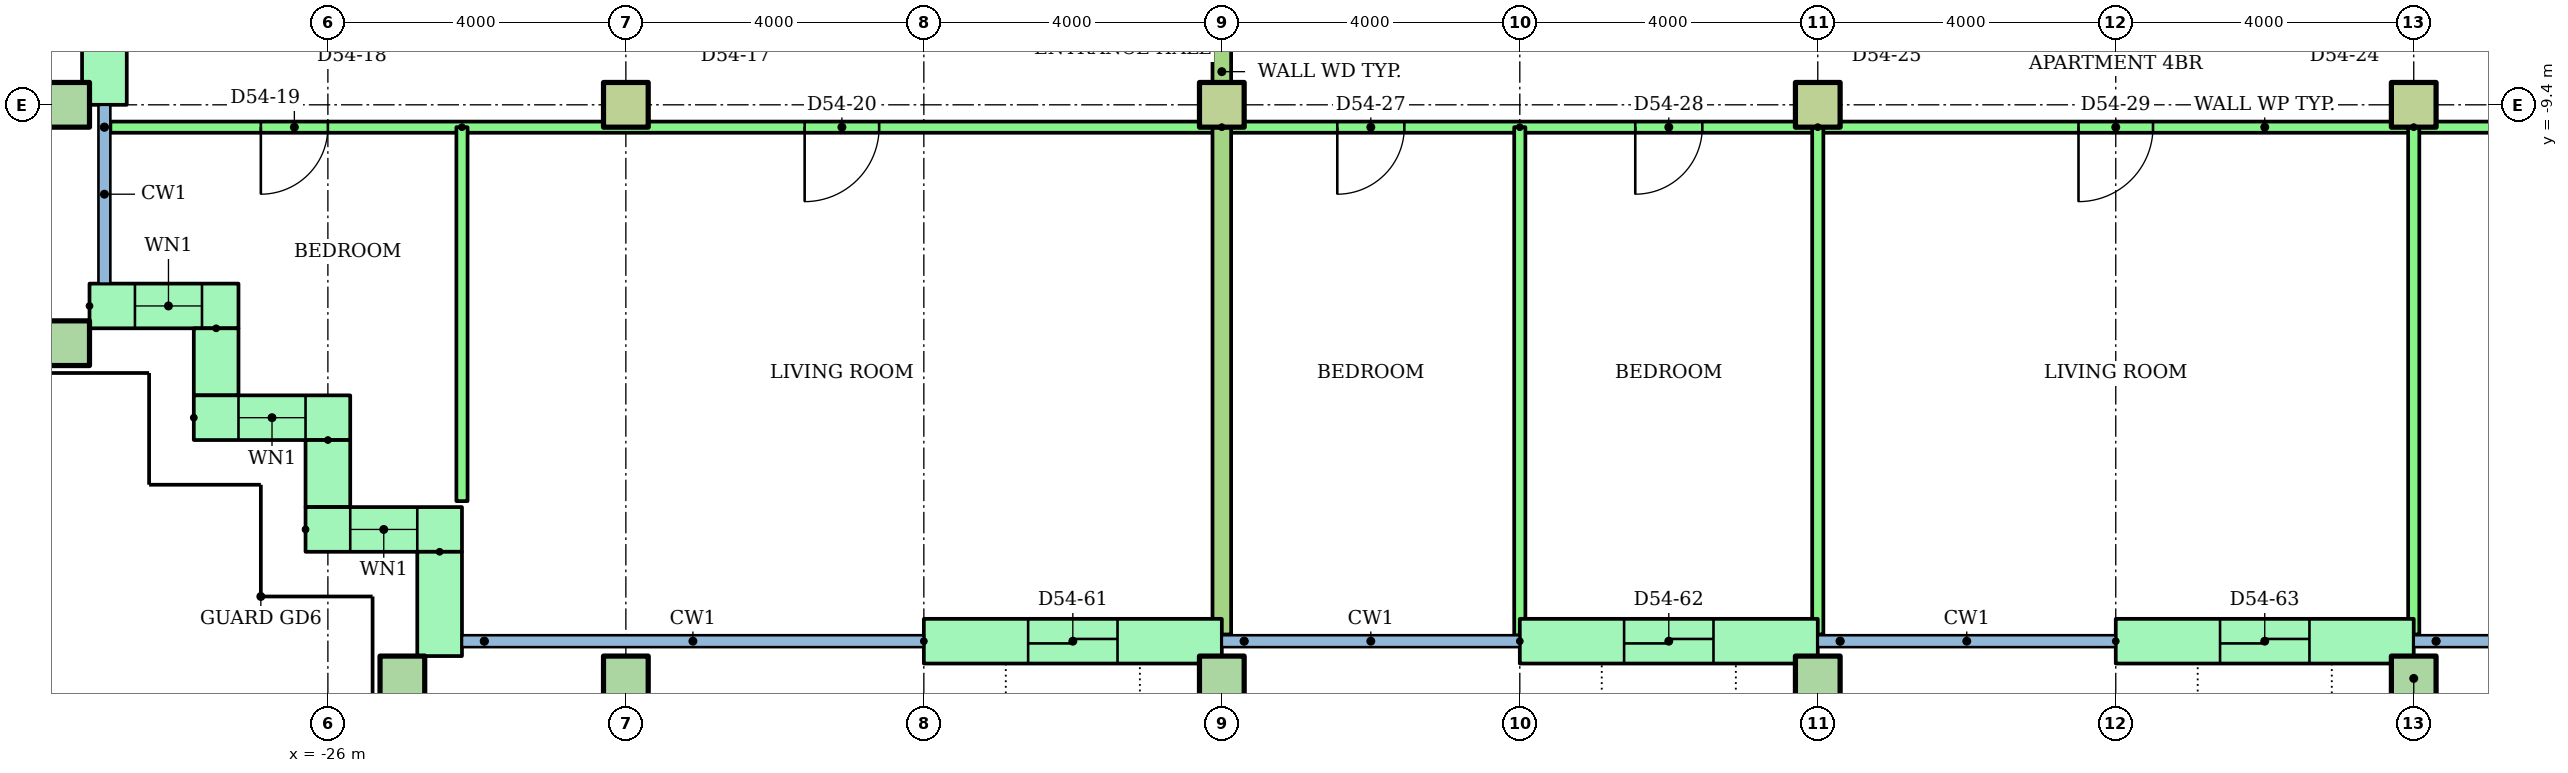
"""IFC4 building model, lengths in metres.
Left out: names, types, materials, properties, quantities, classifications, styles, units other than length and angle.
Written with IfcOpenShell. Run it as: python <this file> out.ifc"""

import sys

from ifc_helpers import new_model, si_unit, direction, frame, frame_2d, origin, origin_2d, place, context, subcontext, project, spatial, rectangle, hollow_rectangle, extrude, element, fill, save


model = new_model("IFC4")
c1 = context("Model", 3, precision=1e-05, world=origin(), true_north=direction((0.0, 1.0)))
c2 = subcontext(c1, "Body", "Model", "MODEL_VIEW")
j1 = project(units=[si_unit("LENGTHUNIT", "METRE"), si_unit("PLANEANGLEUNIT", "RADIAN")], contexts=[c1])
p1 = place(None, origin())
s1 = spatial("IfcSite", under=j1, at=p1, CompositionType="ELEMENT")
p2 = place(p1, origin())
s2 = spatial("IfcBuilding", under=s1, at=p2, CompositionType="ELEMENT")
p3 = place(p2, frame((0.0, 0.0, 210.8)))
s3 = spatial("IfcBuildingStorey", under=s2, at=p3, CompositionType="ELEMENT", Elevation=210.8)
for number, where in (
    (1, (-25.0, -17.1, 0.0)),
    (2, (-22.0, -17.1, 0.0)),
    (3, (-14.0, -17.1, 0.0)),
    (4, (-6.0, -17.1, 0.0)),
    (5, (2.0, -17.1, 0.0)),
    (6, (-29.5, -12.6, 0.0)),
    (7, (-29.5, -9.4, 0.0)),
):
    element("IfcColumn", number, at=place(p3, frame(where)), inside=s3, PredefinedType="COLUMN", context=c2, shape_type="SweptSolid", body=[
        extrude(hollow_rectangle(XDim=0.6, YDim=0.6, WallThickness=0.03, at=origin_2d()), origin(), (0.0, 0.0, 1.0), 3.2),
    ])
for number, where in (
    (8, (-22.0, -9.4, 0.0)),
    (9, (-14.0, -9.4, 0.0)),
    (10, (-6.0, -9.4, 0.0)),
    (11, (2.0, -9.4, 0.0)),
):
    element("IfcColumn", number, at=place(p3, frame(where)), inside=s3, PredefinedType="COLUMN", context=c2, shape_type="SweptSolid", body=[
        extrude(rectangle(XDim=0.6, YDim=0.6, at=origin_2d()), origin(), (0.0, 0.0, 1.0), 3.2),
    ])
p4 = place(p3, frame((-29.0, -5.7, 0.0), z_axis=(0.0, 0.0, 1.0), x_axis=(0.0, -1.0, 0.0)))
e12 = element("IfcWall", 12, at=p4, inside=s3, PredefinedType="STANDARD", context=c2, shape_type="SweptSolid", body=[
    extrude(rectangle(XDim=3.7, YDim=0.6, at=frame_2d((1.85, 0.0))), origin(), (0.0, 0.0, 1.0), 2.92),
])
p5 = place(p4, frame((1.125, 0.0, 0.0)))
e13 = element("IfcOpeningElement", 13, at=p5, cuts=e12, PredefinedType="OPENING", context=c2, shape_type="SweptSolid", body=[
    extrude(rectangle(XDim=1.2, YDim=2.1, at=frame_2d((0.6, 1.05))), frame((0.0, 0.31, 0.0), z_axis=(0.0, -1.0, 0.0), x_axis=(1.0, 0.0, 0.0)), (0.0, 0.0, 1.0), 0.62),
])
p6 = place(p3, frame((-29.2, -12.1, 0.0)))
e14 = element("IfcWall", 14, at=p6, inside=s3, PredefinedType="STANDARD", context=c2, shape_type="SweptSolid", body=[
    extrude(rectangle(XDim=2.0, YDim=0.6, at=frame_2d((1.0, 0.0))), origin(), (0.0, 0.0, 1.0), 2.92),
])
p7 = place(p6, frame((0.61, 0.0, 0.9)))
e15 = element("IfcOpeningElement", 15, at=p7, cuts=e14, PredefinedType="OPENING", context=c2, shape_type="SweptSolid", body=[
    extrude(rectangle(XDim=0.9, YDim=1.5, at=frame_2d((0.45, 0.75))), frame((0.0, 0.31, 0.0), z_axis=(0.0, -1.0, 0.0), x_axis=(1.0, 0.0, 0.0)), (0.0, 0.0, 1.0), 0.62),
])
p8 = place(p3, frame((-27.5, -12.4, 0.0), z_axis=(0.0, 0.0, 1.0), x_axis=(0.0, -1.0, 0.0)))
e16 = element("IfcWall", 16, at=p8, inside=s3, PredefinedType="STANDARD", context=c2, shape_type="SweptSolid", body=[
    extrude(rectangle(XDim=0.9, YDim=0.6, at=frame_2d((0.45, 0.0))), origin(), (0.0, 0.0, 1.0), 2.92),
])
p9 = place(p3, frame((-27.8, -13.6, 0.0)))
e17 = element("IfcWall", 17, at=p9, inside=s3, PredefinedType="STANDARD", context=c2, shape_type="SweptSolid", body=[
    extrude(rectangle(XDim=2.1, YDim=0.6, at=frame_2d((1.05, 0.0))), origin(), (0.0, 0.0, 1.0), 2.92),
])
p10 = place(p9, frame((0.6, 0.0, 0.9)))
e18 = element("IfcOpeningElement", 18, at=p10, cuts=e17, PredefinedType="OPENING", context=c2, shape_type="SweptSolid", body=[
    extrude(rectangle(XDim=0.9, YDim=1.5, at=frame_2d((0.45, 0.75))), frame((0.0, 0.31, 0.0), z_axis=(0.0, -1.0, 0.0), x_axis=(1.0, 0.0, 0.0)), (0.0, 0.0, 1.0), 0.62),
])
p11 = place(p3, frame((-26.0, -13.9, 0.0), z_axis=(0.0, 0.0, 1.0), x_axis=(0.0, -1.0, 0.0)))
e19 = element("IfcWall", 19, at=p11, inside=s3, PredefinedType="STANDARD", context=c2, shape_type="SweptSolid", body=[
    extrude(rectangle(XDim=0.9, YDim=0.6, at=frame_2d((0.45, 0.0))), origin(), (0.0, 0.0, 1.0), 2.92),
])
p12 = place(p3, frame((-26.3, -15.1, 0.0)))
e20 = element("IfcWall", 20, at=p12, inside=s3, PredefinedType="STANDARD", context=c2, shape_type="SweptSolid", body=[
    extrude(rectangle(XDim=2.1, YDim=0.6, at=frame_2d((1.05, 0.0))), origin(), (0.0, 0.0, 1.0), 2.92),
])
p13 = place(p12, frame((0.6, 0.0, 0.9)))
e21 = element("IfcOpeningElement", 21, at=p13, cuts=e20, PredefinedType="OPENING", context=c2, shape_type="SweptSolid", body=[
    extrude(rectangle(XDim=0.9, YDim=1.5, at=frame_2d((0.45, 0.75))), frame((0.0, 0.31, 0.0), z_axis=(0.0, -1.0, 0.0), x_axis=(1.0, 0.0, 0.0)), (0.0, 0.0, 1.0), 0.62),
])
p14 = place(p3, frame((-24.5, -15.4, 0.0), z_axis=(0.0, 0.0, 1.0), x_axis=(0.0, -1.0, 0.0)))
e22 = element("IfcWall", 22, at=p14, inside=s3, PredefinedType="STANDARD", context=c2, shape_type="SweptSolid", body=[
    extrude(rectangle(XDim=1.4, YDim=0.6, at=frame_2d((0.7, 0.0))), origin(), (0.0, 0.0, 1.0), 2.92),
])
p15 = place(p3, frame((-18.0, -16.6, 0.0)))
e23 = element("IfcWall", 23, at=p15, inside=s3, PredefinedType="STANDARD", context=c2, shape_type="SweptSolid", body=[
    extrude(rectangle(XDim=4.0, YDim=0.6, at=frame_2d((2.0, 0.0))), origin(), (0.0, 0.0, 1.0), 2.92),
])
p16 = place(p15, frame((1.4, 0.0, 0.0)))
e24 = element("IfcOpeningElement", 24, at=p16, cuts=e23, PredefinedType="OPENING", context=c2, shape_type="SweptSolid", body=[
    extrude(rectangle(XDim=1.2, YDim=2.1, at=frame_2d((0.6, 1.05))), frame((0.0, 0.31, 0.0), z_axis=(0.0, -1.0, 0.0), x_axis=(1.0, 0.0, 0.0)), (0.0, 0.0, 1.0), 0.62),
])
p17 = place(p3, frame((-10.0, -16.6, 0.0)))
e25 = element("IfcWall", 25, at=p17, inside=s3, PredefinedType="STANDARD", context=c2, shape_type="SweptSolid", body=[
    extrude(rectangle(XDim=4.0, YDim=0.6, at=frame_2d((2.0, 0.0))), origin(), (0.0, 0.0, 1.0), 2.92),
])
p18 = place(p17, frame((1.4, 0.0, 0.0)))
e26 = element("IfcOpeningElement", 26, at=p18, cuts=e25, PredefinedType="OPENING", context=c2, shape_type="SweptSolid", body=[
    extrude(rectangle(XDim=1.2, YDim=2.1, at=frame_2d((0.6, 1.05))), frame((0.0, 0.31, 0.0), z_axis=(0.0, -1.0, 0.0), x_axis=(1.0, 0.0, 0.0)), (0.0, 0.0, 1.0), 0.62),
])
p19 = place(p3, frame((-2.0, -16.6, 0.0)))
e27 = element("IfcWall", 27, at=p19, inside=s3, PredefinedType="STANDARD", context=c2, shape_type="SweptSolid", body=[
    extrude(rectangle(XDim=4.0, YDim=0.6, at=frame_2d((2.0, 0.0))), origin(), (0.0, 0.0, 1.0), 2.92),
])
p20 = place(p19, frame((1.4, 0.0, 0.0)))
e28 = element("IfcOpeningElement", 28, at=p20, cuts=e27, PredefinedType="OPENING", context=c2, shape_type="SweptSolid", body=[
    extrude(rectangle(XDim=1.2, YDim=2.1, at=frame_2d((0.6, 1.05))), frame((0.0, 0.31, 0.0), z_axis=(0.0, -1.0, 0.0), x_axis=(1.0, 0.0, 0.0)), (0.0, 0.0, 1.0), 0.62),
])
p21 = place(p3, frame((-14.0, -9.7, 0.0), z_axis=(0.0, 0.0, 1.0), x_axis=(-1.0, 0.0, 0.0)))
e29 = element("IfcWall", 29, at=p21, inside=s3, PredefinedType="PARTITIONING", context=c2, shape_type="SweptSolid", body=[
    extrude(rectangle(XDim=14.92, YDim=0.15, at=frame_2d((7.46, 0.0))), origin(), (0.0, 0.0, 1.0), 2.4),
])
p22 = place(p21, frame((12.0, 0.0, 0.0)))
e30 = element("IfcOpeningElement", 30, at=p22, cuts=e29, PredefinedType="OPENING", context=c2, shape_type="SweptSolid", body=[
    extrude(rectangle(XDim=0.9, YDim=2.1, at=frame_2d((0.45, 1.05))), frame((0.0, 0.085, 0.0), z_axis=(0.0, -1.0, 0.0), x_axis=(1.0, 0.0, 0.0)), (0.0, 0.0, 1.0), 0.17),
])
p23 = place(p21, frame((4.6, 0.0, 0.0)))
e31 = element("IfcOpeningElement", 31, at=p23, cuts=e29, PredefinedType="OPENING", context=c2, shape_type="SweptSolid", body=[
    extrude(rectangle(XDim=1.0, YDim=2.1, at=frame_2d((0.5, 1.05))), frame((0.0, 0.085, 0.0), z_axis=(0.0, -1.0, 0.0), x_axis=(1.0, 0.0, 0.0)), (0.0, 0.0, 1.0), 0.17),
])
p24 = place(p3, frame((-24.2, -9.7, 0.0), z_axis=(0.0, 0.0, 1.0), x_axis=(0.0, -1.0, 0.0)))
e32 = element("IfcWall", 32, at=p24, inside=s3, PredefinedType="PARTITIONING", context=c2, shape_type="SweptSolid", body=[
    extrude(rectangle(XDim=5.02, YDim=0.15, at=frame_2d((2.51, 0.0))), origin(), (0.0, 0.0, 1.0), 2.4),
])
p25 = place(p3, frame((10.0, -9.7, 0.0), z_axis=(0.0, 0.0, 1.0), x_axis=(-1.0, 0.0, 0.0)))
e33 = element("IfcWall", 33, at=p25, inside=s3, PredefinedType="PARTITIONING", context=c2, shape_type="SweptSolid", body=[
    extrude(rectangle(XDim=24.0, YDim=0.15, at=frame_2d((12.0, 0.0))), origin(), (0.0, 0.0, 1.0), 2.4),
])
p26 = place(p25, frame((21.55, 0.0, 0.0)))
e34 = element("IfcOpeningElement", 34, at=p26, cuts=e33, PredefinedType="OPENING", context=c2, shape_type="SweptSolid", body=[
    extrude(rectangle(XDim=0.9, YDim=2.1, at=frame_2d((0.45, 1.05))), frame((0.0, 0.085, 0.0), z_axis=(0.0, -1.0, 0.0), x_axis=(1.0, 0.0, 0.0)), (0.0, 0.0, 1.0), 0.17),
])
p27 = place(p25, frame((17.55, 0.0, 0.0)))
e35 = element("IfcOpeningElement", 35, at=p27, cuts=e33, PredefinedType="OPENING", context=c2, shape_type="SweptSolid", body=[
    extrude(rectangle(XDim=0.9, YDim=2.1, at=frame_2d((0.45, 1.05))), frame((0.0, 0.085, 0.0), z_axis=(0.0, -1.0, 0.0), x_axis=(1.0, 0.0, 0.0)), (0.0, 0.0, 1.0), 0.17),
])
p28 = place(p25, frame((11.5, 0.0, 0.0)))
e36 = element("IfcOpeningElement", 36, at=p28, cuts=e33, PredefinedType="OPENING", context=c2, shape_type="SweptSolid", body=[
    extrude(rectangle(XDim=1.0, YDim=2.1, at=frame_2d((0.5, 1.05))), frame((0.0, 0.085, 0.0), z_axis=(0.0, -1.0, 0.0), x_axis=(1.0, 0.0, 0.0)), (0.0, 0.0, 1.0), 0.17),
])
p29 = place(p25, frame((5.55, 0.0, 0.0)))
e37 = element("IfcOpeningElement", 37, at=p29, cuts=e33, PredefinedType="OPENING", context=c2, shape_type="SweptSolid", body=[
    extrude(rectangle(XDim=0.9, YDim=2.1, at=frame_2d((0.45, 1.05))), frame((0.0, 0.085, 0.0), z_axis=(0.0, -1.0, 0.0), x_axis=(1.0, 0.0, 0.0)), (0.0, 0.0, 1.0), 0.17),
])
p30 = place(p25, frame((1.55, 0.0, 0.0)))
e38 = element("IfcOpeningElement", 38, at=p30, cuts=e33, PredefinedType="OPENING", context=c2, shape_type="SweptSolid", body=[
    extrude(rectangle(XDim=0.9, YDim=2.1, at=frame_2d((0.45, 1.05))), frame((0.0, 0.085, 0.0), z_axis=(0.0, -1.0, 0.0), x_axis=(1.0, 0.0, 0.0)), (0.0, 0.0, 1.0), 0.17),
])
p31 = place(p3, frame((-10.0, -9.7, 0.0), z_axis=(0.0, 0.0, 1.0), x_axis=(0.0, -1.0, 0.0)))
e39 = element("IfcWall", 39, at=p31, inside=s3, PredefinedType="PARTITIONING", context=c2, shape_type="SweptSolid", body=[
    extrude(rectangle(XDim=6.821, YDim=0.15, at=frame_2d((3.411, 0.0))), origin(), (0.0, 0.0, 1.0), 2.4),
])
for number, where, z_axis, x_axis in (
    (40, (-6.0, -9.7, 0.0), (0.0, 0.0, 1.0), (0.0, -1.0, 0.0)),
    (41, (2.0, -9.7, 0.0), (0.0, 0.0, 1.0), (0.0, -1.0, 0.0)),
):
    element("IfcWall", number, at=place(p3, frame(where, z_axis=z_axis, x_axis=x_axis)), inside=s3, PredefinedType="PARTITIONING", context=c2, shape_type="SweptSolid", body=[
        extrude(rectangle(XDim=6.81, YDim=0.15, at=frame_2d((3.405, 0.0))), origin(), (0.0, 0.0, 1.0), 2.4),
    ])
p32 = place(p3, frame((-14.0, -1.4, 0.0), z_axis=(0.0, 0.0, 1.0), x_axis=(0.0, -1.0, 0.0)))
e42 = element("IfcWall", 42, at=p32, inside=s3, PredefinedType="PARTITIONING", context=c2, shape_type="SweptSolid", body=[
    extrude(rectangle(XDim=15.11, YDim=0.25, at=frame_2d((7.555, 0.0))), origin(), (0.0, 0.0, 1.0), 2.4),
])
p33 = place(p7, origin())
e43 = element("IfcWindow", 43, at=p33, inside=s3, PartitioningType="SINGLE_PANEL", PredefinedType="WINDOW", context=c2, shape_type="SweptSolid", body=[
    extrude(rectangle(XDim=0.9, YDim=1.5, at=frame_2d((0.45, 0.75))), frame((0.0, 0.03, 0.0), z_axis=(0.0, -1.0, 0.0), x_axis=(1.0, 0.0, 0.0)), (0.0, 0.0, 1.0), 0.06),
])
fill(e15, e43)
p34 = place(p10, origin())
e44 = element("IfcWindow", 44, at=p34, inside=s3, PartitioningType="SINGLE_PANEL", PredefinedType="WINDOW", context=c2, shape_type="SweptSolid", body=[
    extrude(rectangle(XDim=0.9, YDim=1.5, at=frame_2d((0.45, 0.75))), frame((0.0, 0.03, 0.0), z_axis=(0.0, -1.0, 0.0), x_axis=(1.0, 0.0, 0.0)), (0.0, 0.0, 1.0), 0.06),
])
fill(e18, e44)
p35 = place(p13, origin())
e45 = element("IfcWindow", 45, at=p35, inside=s3, PartitioningType="SINGLE_PANEL", PredefinedType="WINDOW", context=c2, shape_type="SweptSolid", body=[
    extrude(rectangle(XDim=0.9, YDim=1.5, at=frame_2d((0.45, 0.75))), frame((0.0, 0.03, 0.0), z_axis=(0.0, -1.0, 0.0), x_axis=(1.0, 0.0, 0.0)), (0.0, 0.0, 1.0), 0.06),
])
fill(e21, e45)
p36 = place(p22, origin())
e46 = element("IfcDoor", 46, at=p36, inside=s3, OperationType="SINGLE_SWING_RIGHT", PredefinedType="DOOR", context=c2, shape_type="SweptSolid", body=[
    extrude(rectangle(XDim=0.9, YDim=2.1, at=frame_2d((0.45, 1.05))), frame((0.0, 0.025, 0.0), z_axis=(0.0, -1.0, 0.0), x_axis=(1.0, 0.0, 0.0)), (0.0, 0.0, 1.0), 0.05),
])
fill(e30, e46)
p37 = place(p23, origin())
e47 = element("IfcDoor", 47, at=p37, inside=s3, OperationType="SINGLE_SWING_RIGHT", PredefinedType="DOOR", context=c2, shape_type="SweptSolid", body=[
    extrude(rectangle(XDim=1.0, YDim=2.1, at=frame_2d((0.5, 1.05))), frame((0.0, 0.025, 0.0), z_axis=(0.0, -1.0, 0.0), x_axis=(1.0, 0.0, 0.0)), (0.0, 0.0, 1.0), 0.05),
])
fill(e31, e47)
p38 = place(p26, origin())
e48 = element("IfcDoor", 48, at=p38, inside=s3, OperationType="SINGLE_SWING_RIGHT", PredefinedType="DOOR", context=c2, shape_type="SweptSolid", body=[
    extrude(rectangle(XDim=0.9, YDim=2.1, at=frame_2d((0.45, 1.05))), frame((0.0, 0.025, 0.0), z_axis=(0.0, -1.0, 0.0), x_axis=(1.0, 0.0, 0.0)), (0.0, 0.0, 1.0), 0.05),
])
fill(e34, e48)
p39 = place(p27, origin())
e49 = element("IfcDoor", 49, at=p39, inside=s3, OperationType="SINGLE_SWING_RIGHT", PredefinedType="DOOR", context=c2, shape_type="SweptSolid", body=[
    extrude(rectangle(XDim=0.9, YDim=2.1, at=frame_2d((0.45, 1.05))), frame((0.0, 0.025, 0.0), z_axis=(0.0, -1.0, 0.0), x_axis=(1.0, 0.0, 0.0)), (0.0, 0.0, 1.0), 0.05),
])
fill(e35, e49)
p40 = place(p28, origin())
e50 = element("IfcDoor", 50, at=p40, inside=s3, OperationType="SINGLE_SWING_RIGHT", PredefinedType="DOOR", context=c2, shape_type="SweptSolid", body=[
    extrude(rectangle(XDim=1.0, YDim=2.1, at=frame_2d((0.5, 1.05))), frame((0.0, 0.025, 0.0), z_axis=(0.0, -1.0, 0.0), x_axis=(1.0, 0.0, 0.0)), (0.0, 0.0, 1.0), 0.05),
])
fill(e36, e50)
p41 = place(p16, origin())
e51 = element("IfcDoor", 51, at=p41, inside=s3, OperationType="SLIDING_TO_LEFT", PredefinedType="DOOR", context=c2, shape_type="SweptSolid", body=[
    extrude(rectangle(XDim=1.2, YDim=2.1, at=frame_2d((0.6, 1.05))), frame((0.0, 0.025, 0.0), z_axis=(0.0, -1.0, 0.0), x_axis=(1.0, 0.0, 0.0)), (0.0, 0.0, 1.0), 0.05),
])
fill(e24, e51)
p42 = place(p18, origin())
e52 = element("IfcDoor", 52, at=p42, inside=s3, OperationType="SLIDING_TO_LEFT", PredefinedType="DOOR", context=c2, shape_type="SweptSolid", body=[
    extrude(rectangle(XDim=1.2, YDim=2.1, at=frame_2d((0.6, 1.05))), frame((0.0, 0.025, 0.0), z_axis=(0.0, -1.0, 0.0), x_axis=(1.0, 0.0, 0.0)), (0.0, 0.0, 1.0), 0.05),
])
fill(e26, e52)
p43 = place(p20, origin())
e53 = element("IfcDoor", 53, at=p43, inside=s3, OperationType="SLIDING_TO_LEFT", PredefinedType="DOOR", context=c2, shape_type="SweptSolid", body=[
    extrude(rectangle(XDim=1.2, YDim=2.1, at=frame_2d((0.6, 1.05))), frame((0.0, 0.025, 0.0), z_axis=(0.0, -1.0, 0.0), x_axis=(1.0, 0.0, 0.0)), (0.0, 0.0, 1.0), 0.05),
])
fill(e28, e53)
save(model, sys.argv[1])
